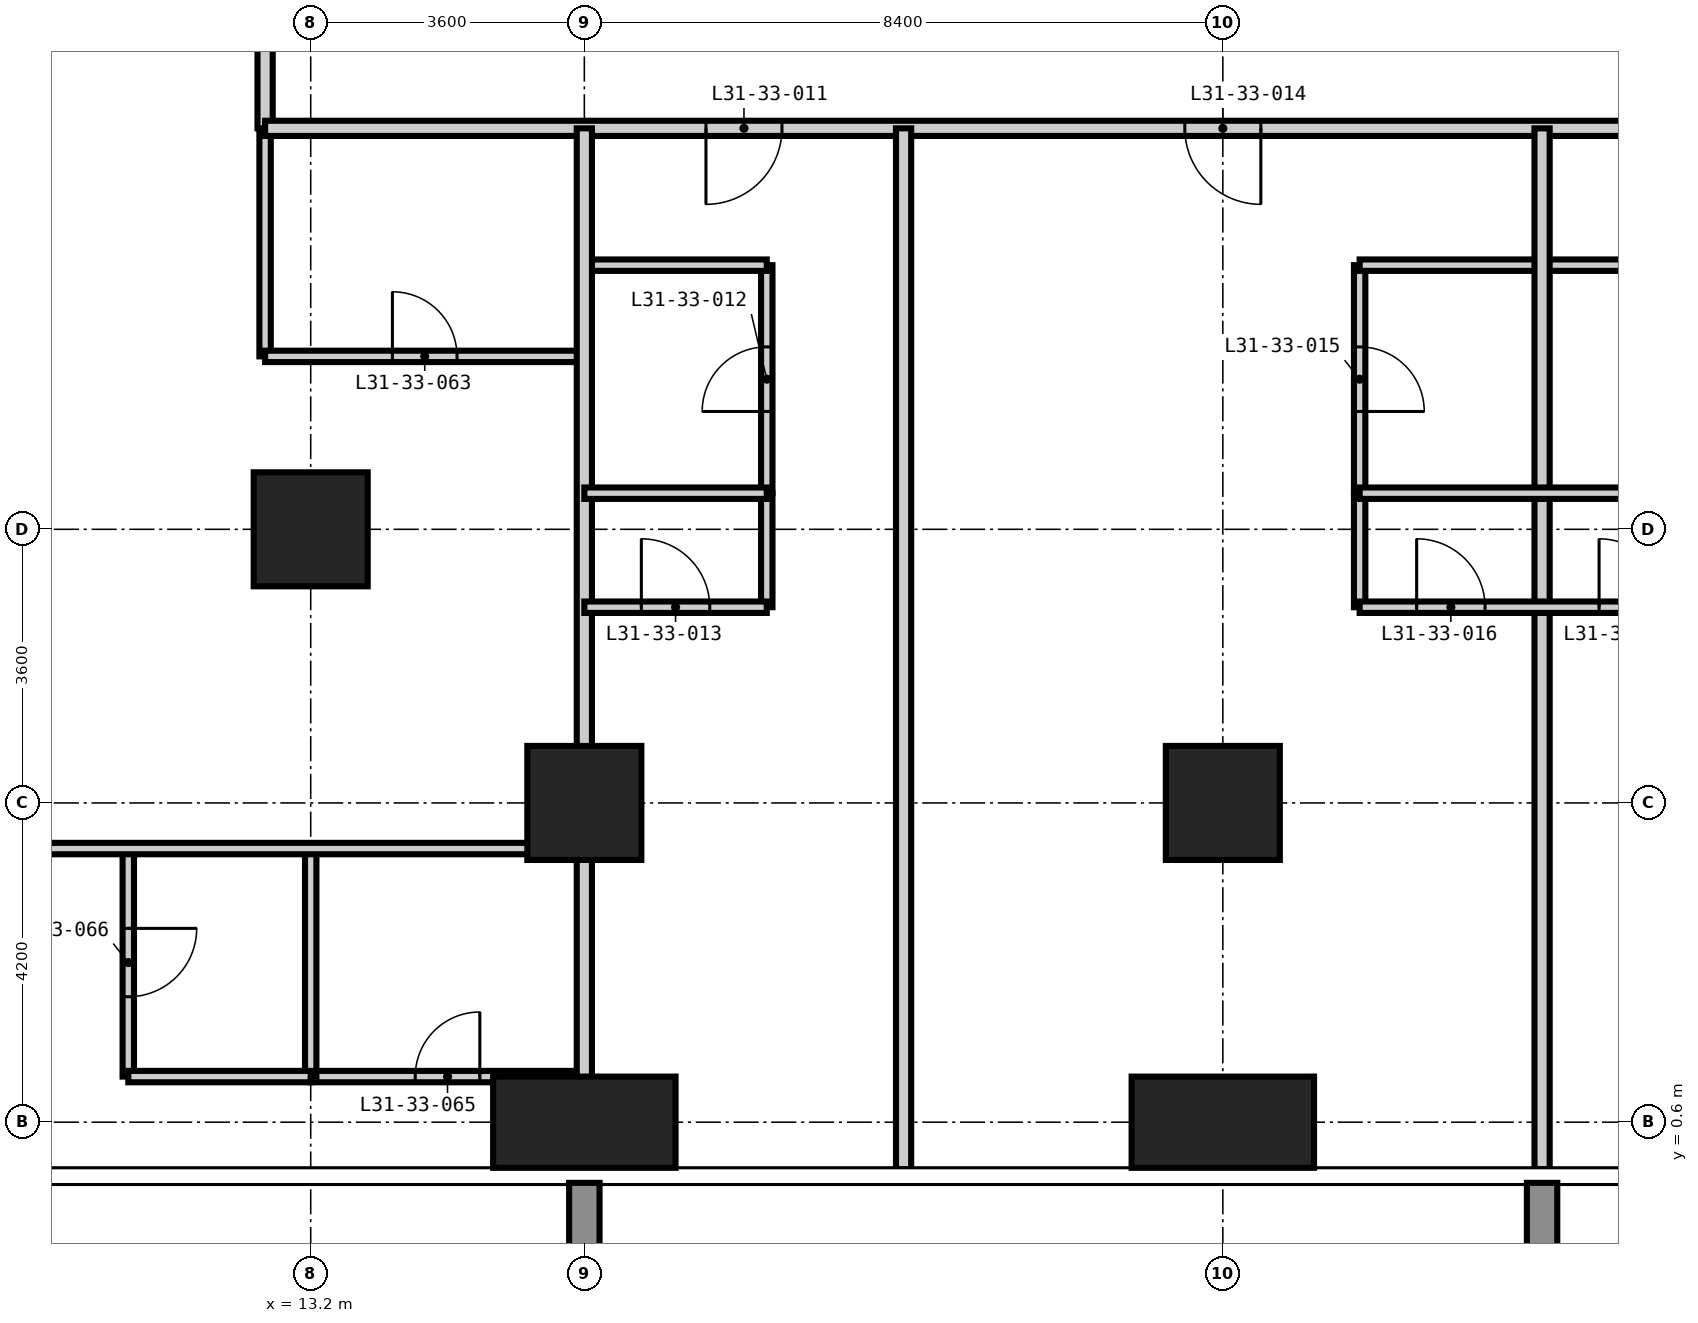
"""IFC4 building model, lengths in metres.
Left out: names, types, materials, properties, quantities, classifications, styles, units other than length and angle.
Written with IfcOpenShell. Run it as: python <this file> out.ifc"""

import sys

from ifc_helpers import new_model, si_unit, direction, frame, frame_2d, origin, origin_2d, place, context, subcontext, project, spatial, rectangle, extrude, element, fill, save


model = new_model("IFC4")
c1 = context("Model", 3, precision=1e-05, world=origin(), true_north=direction((0.0, 1.0)))
c2 = subcontext(c1, "Body", "Model", "MODEL_VIEW")
j1 = project(units=[si_unit("LENGTHUNIT", "METRE"), si_unit("PLANEANGLEUNIT", "RADIAN")], contexts=[c1])
p1 = place(None, origin())
s1 = spatial("IfcSite", under=j1, at=p1, CompositionType="ELEMENT")
p2 = place(p1, origin())
s2 = spatial("IfcBuilding", under=s1, at=p2, CompositionType="ELEMENT")
p3 = place(p2, frame((0.0, 0.0, 122.4)))
s3 = spatial("IfcBuildingStorey", under=s2, at=p3, CompositionType="ELEMENT", Elevation=122.4)
p4 = place(p3, frame((13.2, 8.4, -0.35), z_axis=(0.0, 0.0, 1.0), x_axis=(1.0, 0.0, 0.0)))
e1 = element("IfcColumn", 1, at=p4, inside=s3, PredefinedType="COLUMN", context=c2, shape_type="SweptSolid", body=[
    extrude(rectangle(XDim=1.5, YDim=1.5, at=origin_2d()), origin(), (0.0, 0.0, 1.0), 3.6),
])
p5 = place(p3, frame((16.8, 0.6, -0.35), z_axis=(0.0, 0.0, 1.0), x_axis=(1.0, 0.0, 0.0)))
e2 = element("IfcColumn", 2, at=p5, inside=s3, PredefinedType="COLUMN", context=c2, shape_type="SweptSolid", body=[
    extrude(rectangle(XDim=2.4, YDim=1.2, at=origin_2d()), origin(), (0.0, 0.0, 1.0), 3.6),
])
p6 = place(p3, frame((16.8, 4.8, -0.35), z_axis=(0.0, 0.0, 1.0), x_axis=(1.0, 0.0, 0.0)))
e3 = element("IfcColumn", 3, at=p6, inside=s3, PredefinedType="COLUMN", context=c2, shape_type="SweptSolid", body=[
    extrude(rectangle(XDim=1.5, YDim=1.5, at=origin_2d()), origin(), (0.0, 0.0, 1.0), 3.6),
])
p7 = place(p3, frame((25.2, 0.6, -0.35), z_axis=(0.0, 0.0, 1.0), x_axis=(1.0, 0.0, 0.0)))
e4 = element("IfcColumn", 4, at=p7, inside=s3, PredefinedType="COLUMN", context=c2, shape_type="SweptSolid", body=[
    extrude(rectangle(XDim=2.4, YDim=1.2, at=origin_2d()), origin(), (0.0, 0.0, 1.0), 3.6),
])
p8 = place(p3, frame((25.2, 4.8, -0.35), z_axis=(0.0, 0.0, 1.0), x_axis=(1.0, 0.0, 0.0)))
e5 = element("IfcColumn", 5, at=p8, inside=s3, PredefinedType="COLUMN", context=c2, shape_type="SweptSolid", body=[
    extrude(rectangle(XDim=1.5, YDim=1.5, at=origin_2d()), origin(), (0.0, 0.0, 1.0), 3.6),
])
p9 = place(p3, frame((12.6, 10.675, 0.0), z_axis=(0.0, 0.0, 1.0), x_axis=(0.0, 1.0, 0.0)))
e6 = element("IfcWall", 6, at=p9, inside=s3, PredefinedType="PARTITIONING", context=c2, shape_type="SweptSolid", body=[
    extrude(rectangle(XDim=3.0, YDim=0.15, at=frame_2d((1.5, 0.0))), origin(), (0.0, 0.0, 1.0), 3.25),
])
p10 = place(p3, frame((19.2, 8.875, 0.0), z_axis=(0.0, 0.0, 1.0), x_axis=(0.0, 1.0, 0.0)))
e7 = element("IfcWall", 7, at=p10, inside=s3, PredefinedType="PARTITIONING", context=c2, shape_type="SweptSolid", body=[
    extrude(rectangle(XDim=3.0, YDim=0.15, at=frame_2d((1.5, 0.0))), origin(), (0.0, 0.0, 1.0), 3.25),
])
p11 = place(p10, frame((1.075, 0.0, 0.0)))
e8 = element("IfcOpeningElement", 8, at=p11, cuts=e7, PredefinedType="OPENING", context=c2, shape_type="SweptSolid", body=[
    extrude(rectangle(XDim=0.85, YDim=2.1, at=frame_2d((0.425, 1.05))), frame((0.0, 0.085, 0.0), z_axis=(0.0, -1.0, 0.0), x_axis=(1.0, 0.0, 0.0)), (0.0, 0.0, 1.0), 0.17),
])
p12 = place(p3, frame((27.0, 8.875, 0.0), z_axis=(0.0, 0.0, 1.0), x_axis=(0.0, 1.0, 0.0)))
e9 = element("IfcWall", 9, at=p12, inside=s3, PredefinedType="PARTITIONING", context=c2, shape_type="SweptSolid", body=[
    extrude(rectangle(XDim=3.0, YDim=0.15, at=frame_2d((1.5, 0.0))), origin(), (0.0, 0.0, 1.0), 3.25),
])
p13 = place(p12, frame((1.075, 0.0, 0.0)))
e10 = element("IfcOpeningElement", 10, at=p13, cuts=e9, PredefinedType="OPENING", context=c2, shape_type="SweptSolid", body=[
    extrude(rectangle(XDim=0.85, YDim=2.1, at=frame_2d((0.425, 1.05))), frame((0.0, 0.085, 0.0), z_axis=(0.0, -1.0, 0.0), x_axis=(1.0, 0.0, 0.0)), (0.0, 0.0, 1.0), 0.17),
])
p14 = place(p3, frame((13.2, 1.2, 0.0), z_axis=(0.0, 0.0, 1.0), x_axis=(1.0, 0.0, 0.0)))
e11 = element("IfcWall", 11, at=p14, inside=s3, PredefinedType="PARTITIONING", context=c2, shape_type="SweptSolid", body=[
    extrude(rectangle(XDim=3.6, YDim=0.15, at=frame_2d((1.8, 0.0))), origin(), (0.0, 0.0, 1.0), 3.25),
])
p15 = place(p14, frame((1.375, 0.0, 0.0)))
e12 = element("IfcOpeningElement", 12, at=p15, cuts=e11, PredefinedType="OPENING", context=c2, shape_type="SweptSolid", body=[
    extrude(rectangle(XDim=0.85, YDim=2.1, at=frame_2d((0.425, 1.05))), frame((0.0, 0.085, 0.0), z_axis=(0.0, -1.0, 0.0), x_axis=(1.0, 0.0, 0.0)), (0.0, 0.0, 1.0), 0.17),
])
p16 = place(p3, frame((12.6, 10.675, 0.0), z_axis=(0.0, 0.0, 1.0), x_axis=(1.0, 0.0, 0.0)))
e13 = element("IfcWall", 13, at=p16, inside=s3, PredefinedType="PARTITIONING", context=c2, shape_type="SweptSolid", body=[
    extrude(rectangle(XDim=4.2, YDim=0.15, at=frame_2d((2.1, 0.0))), origin(), (0.0, 0.0, 1.0), 3.25),
])
p17 = place(p16, frame((1.675, 0.0, 0.0)))
e14 = element("IfcOpeningElement", 14, at=p17, cuts=e13, PredefinedType="OPENING", context=c2, shape_type="SweptSolid", body=[
    extrude(rectangle(XDim=0.85, YDim=2.1, at=frame_2d((0.425, 1.05))), frame((0.0, 0.085, 0.0), z_axis=(0.0, -1.0, 0.0), x_axis=(1.0, 0.0, 0.0)), (0.0, 0.0, 1.0), 0.17),
])
p18 = place(p3, frame((16.8, 11.875, 0.0), z_axis=(0.0, 0.0, 1.0), x_axis=(1.0, 0.0, 0.0)))
e15 = element("IfcWall", 15, at=p18, inside=s3, PredefinedType="PARTITIONING", context=c2, shape_type="SweptSolid", body=[
    extrude(rectangle(XDim=2.4, YDim=0.15, at=frame_2d((1.2, 0.0))), origin(), (0.0, 0.0, 1.0), 3.25),
])
p19 = place(p3, frame((27.0, 11.875, 0.0), z_axis=(0.0, 0.0, 1.0), x_axis=(1.0, 0.0, 0.0)))
e16 = element("IfcWall", 16, at=p19, inside=s3, PredefinedType="PARTITIONING", context=c2, shape_type="SweptSolid", body=[
    extrude(rectangle(XDim=4.8, YDim=0.15, at=frame_2d((2.4, 0.0))), origin(), (0.0, 0.0, 1.0), 3.25),
])
p20 = place(p3, frame((12.6, 13.675, 0.0), z_axis=(0.0, 0.0, 1.0), x_axis=(0.0, 1.0, 0.0)))
e17 = element("IfcWall", 17, at=p20, inside=s3, PredefinedType="PARTITIONING", context=c2, shape_type="SweptSolid", body=[
    extrude(rectangle(XDim=32.05, YDim=0.2, at=frame_2d((16.025, 0.0))), origin(), (0.0, 0.0, 1.0), 3.25),
])
p21 = place(p20, frame((6.825, 0.0, 0.0)))
e18 = element("IfcOpeningElement", 18, at=p21, cuts=e17, PredefinedType="OPENING", context=c2, shape_type="SweptSolid", body=[
    extrude(rectangle(XDim=1.0, YDim=2.2, at=frame_2d((0.5, 1.1))), frame((0.0, 0.11, 0.0), z_axis=(0.0, -1.0, 0.0), x_axis=(1.0, 0.0, 0.0)), (0.0, 0.0, 1.0), 0.22),
])
p22 = place(p20, frame((15.225, 0.0, 0.0)))
e19 = element("IfcOpeningElement", 19, at=p22, cuts=e17, PredefinedType="OPENING", context=c2, shape_type="SweptSolid", body=[
    extrude(rectangle(XDim=1.0, YDim=2.2, at=frame_2d((0.5, 1.1))), frame((0.0, 0.11, 0.0), z_axis=(0.0, -1.0, 0.0), x_axis=(1.0, 0.0, 0.0)), (0.0, 0.0, 1.0), 0.22),
])
p23 = place(p20, frame((23.625, 0.0, 0.0)))
e20 = element("IfcOpeningElement", 20, at=p23, cuts=e17, PredefinedType="OPENING", context=c2, shape_type="SweptSolid", body=[
    extrude(rectangle(XDim=1.0, YDim=2.2, at=frame_2d((0.5, 1.1))), frame((0.0, 0.11, 0.0), z_axis=(0.0, -1.0, 0.0), x_axis=(1.0, 0.0, 0.0)), (0.0, 0.0, 1.0), 0.22),
])
p24 = place(p20, frame((1.063, 0.0, 0.0)))
e21 = element("IfcOpeningElement", 21, at=p24, cuts=e17, PredefinedType="OPENING", context=c2, shape_type="SweptSolid", body=[
    extrude(rectangle(XDim=1.0, YDim=2.2, at=frame_2d((0.5, 1.1))), frame((0.0, 0.11, 0.0), z_axis=(0.0, -1.0, 0.0), x_axis=(1.0, 0.0, 0.0)), (0.0, 0.0, 1.0), 0.22),
])
p25 = place(p20, frame((29.687, 0.0, 0.0)))
e22 = element("IfcOpeningElement", 22, at=p25, cuts=e17, PredefinedType="OPENING", context=c2, shape_type="SweptSolid", body=[
    extrude(rectangle(XDim=1.0, YDim=2.2, at=frame_2d((0.5, 1.1))), frame((0.0, 0.11, 0.0), z_axis=(0.0, -1.0, 0.0), x_axis=(1.0, 0.0, 0.0)), (0.0, 0.0, 1.0), 0.22),
])
p26 = place(p3, frame((44.525, 13.675, 0.0), z_axis=(0.0, 0.0, 1.0), x_axis=(-1.0, 0.0, 0.0)))
e23 = element("IfcWall", 23, at=p26, inside=s3, PredefinedType="PARTITIONING", context=c2, shape_type="SweptSolid", body=[
    extrude(rectangle(XDim=31.925, YDim=0.2, at=frame_2d((15.962, 0.0))), origin(), (0.0, 0.0, 1.0), 3.25),
])
p27 = place(p26, frame((25.125, 0.0, 0.0)))
e24 = element("IfcOpeningElement", 24, at=p27, cuts=e23, PredefinedType="OPENING", context=c2, shape_type="SweptSolid", body=[
    extrude(rectangle(XDim=1.0, YDim=2.2, at=frame_2d((0.5, 1.1))), frame((0.0, 0.11, 0.0), z_axis=(0.0, -1.0, 0.0), x_axis=(1.0, 0.0, 0.0)), (0.0, 0.0, 1.0), 0.22),
])
p28 = place(p26, frame((18.825, 0.0, 0.0)))
e25 = element("IfcOpeningElement", 25, at=p28, cuts=e23, PredefinedType="OPENING", context=c2, shape_type="SweptSolid", body=[
    extrude(rectangle(XDim=1.0, YDim=2.2, at=frame_2d((0.5, 1.1))), frame((0.0, 0.11, 0.0), z_axis=(0.0, -1.0, 0.0), x_axis=(1.0, 0.0, 0.0)), (0.0, 0.0, 1.0), 0.22),
])
p29 = place(p26, frame((10.425, 0.0, 0.0)))
e26 = element("IfcOpeningElement", 26, at=p29, cuts=e23, PredefinedType="OPENING", context=c2, shape_type="SweptSolid", body=[
    extrude(rectangle(XDim=1.0, YDim=2.2, at=frame_2d((0.5, 1.1))), frame((0.0, 0.11, 0.0), z_axis=(0.0, -1.0, 0.0), x_axis=(1.0, 0.0, 0.0)), (0.0, 0.0, 1.0), 0.22),
])
p30 = place(p26, frame((4.125, 0.0, 0.0)))
e27 = element("IfcOpeningElement", 27, at=p30, cuts=e23, PredefinedType="OPENING", context=c2, shape_type="SweptSolid", body=[
    extrude(rectangle(XDim=1.0, YDim=2.2, at=frame_2d((0.5, 1.1))), frame((0.0, 0.11, 0.0), z_axis=(0.0, -1.0, 0.0), x_axis=(1.0, 0.0, 0.0)), (0.0, 0.0, 1.0), 0.22),
])
for number, where, z_axis, x_axis in (
    (28, (16.8, -0.018, 0.0), (0.0, 0.0, 1.0), (0.0, 1.0, 0.0)),
    (29, (21.0, -0.018, 0.0), (0.0, 0.0, 1.0), (0.0, 1.0, 0.0)),
    (30, (29.4, -0.018, 0.0), (0.0, 0.0, 1.0), (0.0, 1.0, 0.0)),
):
    element("IfcWall", number, at=place(p3, frame(where, z_axis=z_axis, x_axis=x_axis)), inside=s3, PredefinedType="PARTITIONING", context=c2, shape_type="SweptSolid", body=[
        extrude(rectangle(XDim=13.693, YDim=0.2, at=frame_2d((6.847, 0.0))), origin(), (0.0, 0.0, 1.0), 3.25),
    ])
p31 = place(p3, frame((10.8, 1.2, 0.0), z_axis=(0.0, 0.0, 1.0), x_axis=(0.0, 1.0, 0.0)))
e31 = element("IfcWall", 31, at=p31, inside=s3, PredefinedType="PARTITIONING", context=c2, shape_type="SweptSolid", body=[
    extrude(rectangle(XDim=3.0, YDim=0.15, at=frame_2d((1.5, 0.0))), origin(), (0.0, 0.0, 1.0), 3.25),
])
p32 = place(p31, frame((1.05, 0.0, 0.0)))
e32 = element("IfcOpeningElement", 32, at=p32, cuts=e31, PredefinedType="OPENING", context=c2, shape_type="SweptSolid", body=[
    extrude(rectangle(XDim=0.9, YDim=2.1, at=frame_2d((0.45, 1.05))), frame((0.0, 0.085, 0.0), z_axis=(0.0, -1.0, 0.0), x_axis=(1.0, 0.0, 0.0)), (0.0, 0.0, 1.0), 0.17),
])
p33 = place(p3, frame((13.2, 1.2, 0.0), z_axis=(0.0, 0.0, 1.0), x_axis=(0.0, 1.0, 0.0)))
e33 = element("IfcWall", 33, at=p33, inside=s3, PredefinedType="PARTITIONING", context=c2, shape_type="SweptSolid", body=[
    extrude(rectangle(XDim=3.0, YDim=0.15, at=frame_2d((1.5, 0.0))), origin(), (0.0, 0.0, 1.0), 3.25),
])
for number, where, z_axis, x_axis in (
    (34, (19.2, 7.375, 0.0), (0.0, 0.0, 1.0), (0.0, 1.0, 0.0)),
    (35, (27.0, 7.375, 0.0), (0.0, 0.0, 1.0), (0.0, 1.0, 0.0)),
):
    element("IfcWall", number, at=place(p3, frame(where, z_axis=z_axis, x_axis=x_axis)), inside=s3, PredefinedType="PARTITIONING", context=c2, shape_type="SweptSolid", body=[
        extrude(rectangle(XDim=1.5, YDim=0.15, at=frame_2d((0.75, 0.0))), origin(), (0.0, 0.0, 1.0), 3.25),
    ])
p34 = place(p3, frame((10.8, 1.2, 0.0), z_axis=(0.0, 0.0, 1.0), x_axis=(1.0, 0.0, 0.0)))
e36 = element("IfcWall", 36, at=p34, inside=s3, PredefinedType="PARTITIONING", context=c2, shape_type="SweptSolid", body=[
    extrude(rectangle(XDim=2.4, YDim=0.15, at=frame_2d((1.2, 0.0))), origin(), (0.0, 0.0, 1.0), 3.25),
])
p35 = place(p3, frame((-0.018, 4.2, 0.0), z_axis=(0.0, 0.0, 1.0), x_axis=(1.0, 0.0, 0.0)))
e37 = element("IfcWall", 37, at=p35, inside=s3, PredefinedType="PARTITIONING", context=c2, shape_type="SweptSolid", body=[
    extrude(rectangle(XDim=16.818, YDim=0.15, at=frame_2d((8.409, 0.0))), origin(), (0.0, 0.0, 1.0), 3.25),
])
p36 = place(p35, frame((4.968, 0.0, 0.0)))
e38 = element("IfcOpeningElement", 38, at=p36, cuts=e37, PredefinedType="OPENING", context=c2, shape_type="SweptSolid", body=[
    extrude(rectangle(XDim=0.9, YDim=2.1, at=frame_2d((0.45, 1.05))), frame((0.0, 0.085, 0.0), z_axis=(0.0, -1.0, 0.0), x_axis=(1.0, 0.0, 0.0)), (0.0, 0.0, 1.0), 0.17),
])
p37 = place(p3, frame((16.8, 7.375, 0.0), z_axis=(0.0, 0.0, 1.0), x_axis=(1.0, 0.0, 0.0)))
e39 = element("IfcWall", 39, at=p37, inside=s3, PredefinedType="PARTITIONING", context=c2, shape_type="SweptSolid", body=[
    extrude(rectangle(XDim=2.4, YDim=0.15, at=frame_2d((1.2, 0.0))), origin(), (0.0, 0.0, 1.0), 3.25),
])
p38 = place(p37, frame((0.75, 0.0, 0.0)))
e40 = element("IfcOpeningElement", 40, at=p38, cuts=e39, PredefinedType="OPENING", context=c2, shape_type="SweptSolid", body=[
    extrude(rectangle(XDim=0.9, YDim=2.1, at=frame_2d((0.45, 1.05))), frame((0.0, 0.085, 0.0), z_axis=(0.0, -1.0, 0.0), x_axis=(1.0, 0.0, 0.0)), (0.0, 0.0, 1.0), 0.17),
])
p39 = place(p3, frame((27.0, 7.375, 0.0), z_axis=(0.0, 0.0, 1.0), x_axis=(1.0, 0.0, 0.0)))
e41 = element("IfcWall", 41, at=p39, inside=s3, PredefinedType="PARTITIONING", context=c2, shape_type="SweptSolid", body=[
    extrude(rectangle(XDim=4.8, YDim=0.15, at=frame_2d((2.4, 0.0))), origin(), (0.0, 0.0, 1.0), 3.25),
])
p40 = place(p39, frame((0.75, 0.0, 0.0)))
e42 = element("IfcOpeningElement", 42, at=p40, cuts=e41, PredefinedType="OPENING", context=c2, shape_type="SweptSolid", body=[
    extrude(rectangle(XDim=0.9, YDim=2.1, at=frame_2d((0.45, 1.05))), frame((0.0, 0.085, 0.0), z_axis=(0.0, -1.0, 0.0), x_axis=(1.0, 0.0, 0.0)), (0.0, 0.0, 1.0), 0.17),
])
p41 = place(p39, frame((3.15, 0.0, 0.0)))
e43 = element("IfcOpeningElement", 43, at=p41, cuts=e41, PredefinedType="OPENING", context=c2, shape_type="SweptSolid", body=[
    extrude(rectangle(XDim=0.9, YDim=2.1, at=frame_2d((0.45, 1.05))), frame((0.0, 0.085, 0.0), z_axis=(0.0, -1.0, 0.0), x_axis=(1.0, 0.0, 0.0)), (0.0, 0.0, 1.0), 0.17),
])
p42 = place(p3, frame((16.8, 8.875, 0.0), z_axis=(0.0, 0.0, 1.0), x_axis=(1.0, 0.0, 0.0)))
e44 = element("IfcWall", 44, at=p42, inside=s3, PredefinedType="PARTITIONING", context=c2, shape_type="SweptSolid", body=[
    extrude(rectangle(XDim=2.4, YDim=0.15, at=frame_2d((1.2, 0.0))), origin(), (0.0, 0.0, 1.0), 3.25),
])
p43 = place(p3, frame((27.0, 8.875, 0.0), z_axis=(0.0, 0.0, 1.0), x_axis=(1.0, 0.0, 0.0)))
e45 = element("IfcWall", 45, at=p43, inside=s3, PredefinedType="PARTITIONING", context=c2, shape_type="SweptSolid", body=[
    extrude(rectangle(XDim=4.8, YDim=0.15, at=frame_2d((2.4, 0.0))), origin(), (0.0, 0.0, 1.0), 3.25),
])
p44 = place(p27, origin())
e46 = element("IfcDoor", 46, at=p44, inside=s3, OperationType="SINGLE_SWING_RIGHT", PredefinedType="DOOR", context=c2, shape_type="SweptSolid", body=[
    extrude(rectangle(XDim=1.0, YDim=2.2, at=frame_2d((0.5, 1.1))), frame((0.0, 0.025, 0.0), z_axis=(0.0, -1.0, 0.0), x_axis=(1.0, 0.0, 0.0)), (0.0, 0.0, 1.0), 0.05),
])
fill(e24, e46)
p45 = place(p11, origin())
e47 = element("IfcDoor", 47, at=p45, inside=s3, OperationType="SINGLE_SWING_LEFT", PredefinedType="DOOR", context=c2, shape_type="SweptSolid", body=[
    extrude(rectangle(XDim=0.85, YDim=2.1, at=frame_2d((0.425, 1.05))), frame((0.0, 0.025, 0.0), z_axis=(0.0, -1.0, 0.0), x_axis=(1.0, 0.0, 0.0)), (0.0, 0.0, 1.0), 0.05),
])
fill(e8, e47)
p46 = place(p38, origin())
e48 = element("IfcDoor", 48, at=p46, inside=s3, OperationType="SINGLE_SWING_LEFT", PredefinedType="DOOR", context=c2, shape_type="SweptSolid", body=[
    extrude(rectangle(XDim=0.9, YDim=2.1, at=frame_2d((0.45, 1.05))), frame((0.0, 0.025, 0.0), z_axis=(0.0, -1.0, 0.0), x_axis=(1.0, 0.0, 0.0)), (0.0, 0.0, 1.0), 0.05),
])
fill(e40, e48)
p47 = place(p28, origin())
e49 = element("IfcDoor", 49, at=p47, inside=s3, OperationType="SINGLE_SWING_LEFT", PredefinedType="DOOR", context=c2, shape_type="SweptSolid", body=[
    extrude(rectangle(XDim=1.0, YDim=2.2, at=frame_2d((0.5, 1.1))), frame((0.0, 0.025, 0.0), z_axis=(0.0, -1.0, 0.0), x_axis=(1.0, 0.0, 0.0)), (0.0, 0.0, 1.0), 0.05),
])
fill(e25, e49)
p48 = place(p13, frame((0.85, 0.0, 0.0), z_axis=(0.0, 0.0, 1.0), x_axis=(-1.0, 0.0, 0.0)))
e50 = element("IfcDoor", 50, at=p48, inside=s3, OperationType="SINGLE_SWING_RIGHT", PredefinedType="DOOR", context=c2, shape_type="SweptSolid", body=[
    extrude(rectangle(XDim=0.85, YDim=2.1, at=frame_2d((0.425, 1.05))), frame((0.0, 0.025, 0.0), z_axis=(0.0, -1.0, 0.0), x_axis=(1.0, 0.0, 0.0)), (0.0, 0.0, 1.0), 0.05),
])
fill(e10, e50)
p49 = place(p40, origin())
e51 = element("IfcDoor", 51, at=p49, inside=s3, OperationType="SINGLE_SWING_LEFT", PredefinedType="DOOR", context=c2, shape_type="SweptSolid", body=[
    extrude(rectangle(XDim=0.9, YDim=2.1, at=frame_2d((0.45, 1.05))), frame((0.0, 0.025, 0.0), z_axis=(0.0, -1.0, 0.0), x_axis=(1.0, 0.0, 0.0)), (0.0, 0.0, 1.0), 0.05),
])
fill(e42, e51)
p50 = place(p41, origin())
e52 = element("IfcDoor", 52, at=p50, inside=s3, OperationType="SINGLE_SWING_LEFT", PredefinedType="DOOR", context=c2, shape_type="SweptSolid", body=[
    extrude(rectangle(XDim=0.9, YDim=2.1, at=frame_2d((0.45, 1.05))), frame((0.0, 0.025, 0.0), z_axis=(0.0, -1.0, 0.0), x_axis=(1.0, 0.0, 0.0)), (0.0, 0.0, 1.0), 0.05),
])
fill(e43, e52)
p51 = place(p17, origin())
e53 = element("IfcDoor", 53, at=p51, inside=s3, OperationType="SINGLE_SWING_LEFT", PredefinedType="DOOR", context=c2, shape_type="SweptSolid", body=[
    extrude(rectangle(XDim=0.85, YDim=2.1, at=frame_2d((0.425, 1.05))), frame((0.0, 0.025, 0.0), z_axis=(0.0, -1.0, 0.0), x_axis=(1.0, 0.0, 0.0)), (0.0, 0.0, 1.0), 0.05),
])
fill(e14, e53)
p52 = place(p15, origin())
e54 = element("IfcDoor", 54, at=p52, inside=s3, OperationType="SINGLE_SWING_RIGHT", PredefinedType="DOOR", context=c2, shape_type="SweptSolid", body=[
    extrude(rectangle(XDim=0.85, YDim=2.1, at=frame_2d((0.425, 1.05))), frame((0.0, 0.025, 0.0), z_axis=(0.0, -1.0, 0.0), x_axis=(1.0, 0.0, 0.0)), (0.0, 0.0, 1.0), 0.05),
])
fill(e12, e54)
p53 = place(p32, frame((0.9, 0.0, 0.0), z_axis=(0.0, 0.0, 1.0), x_axis=(-1.0, 0.0, 0.0)))
e55 = element("IfcDoor", 55, at=p53, inside=s3, OperationType="SINGLE_SWING_LEFT", PredefinedType="DOOR", context=c2, shape_type="SweptSolid", body=[
    extrude(rectangle(XDim=0.9, YDim=2.1, at=frame_2d((0.45, 1.05))), frame((0.0, 0.025, 0.0), z_axis=(0.0, -1.0, 0.0), x_axis=(1.0, 0.0, 0.0)), (0.0, 0.0, 1.0), 0.05),
])
fill(e32, e55)
save(model, sys.argv[1])
